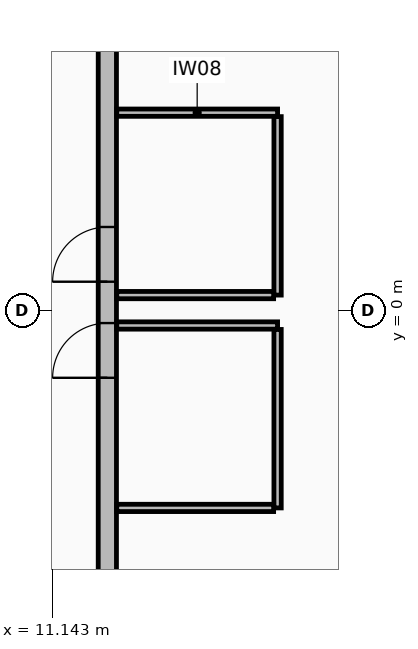
"""IFC4 building model, lengths in metres.
Left out: names, types, materials, properties, quantities, classifications, styles, units other than length and angle.
Written with IfcOpenShell. Run it as: python <this file> out.ifc"""

import sys

from ifc_helpers import new_model, si_unit, direction, frame, frame_2d, origin, place, context, subcontext, project, spatial, rectangle, extrude, element, fill, save


model = new_model("IFC4")
c1 = context("Model", 3, precision=1e-05, world=origin(), true_north=direction((0.0, 1.0)))
c2 = subcontext(c1, "Body", "Model", "MODEL_VIEW")
j1 = project(units=[si_unit("LENGTHUNIT", "METRE"), si_unit("PLANEANGLEUNIT", "RADIAN")], contexts=[c1])
p1 = place(None, origin())
s1 = spatial("IfcSite", under=j1, at=p1, CompositionType="ELEMENT")
p2 = place(p1, origin())
s2 = spatial("IfcBuilding", under=s1, at=p2, CompositionType="ELEMENT")
p3 = place(p2, frame((0.0, 0.0, 165.15)))
s3 = spatial("IfcBuildingStorey", under=s2, at=p3, CompositionType="ELEMENT", Elevation=165.15)
p4 = place(p3, frame((12.05, -10.75, 0.0), z_axis=(0.0, 0.0, 1.0), x_axis=(0.0, 1.0, 0.0)))
e1 = element("IfcWall", 1, at=p4, inside=s3, PredefinedType="STANDARD", context=c2, shape_type="SweptSolid", body=[
    extrude(rectangle(XDim=21.5, YDim=0.3, at=frame_2d((10.75, 0.0))), origin(), (0.0, 0.0, 1.0), 4.465),
])
p5 = place(p4, frame((11.22, 0.0, 0.0)))
e2 = element("IfcOpeningElement", 2, at=p5, cuts=e1, PredefinedType="OPENING", context=c2, shape_type="SweptSolid", body=[
    extrude(rectangle(XDim=0.9, YDim=2.1, at=frame_2d((0.45, 1.05))), frame((0.0, 0.16, 0.0), z_axis=(0.0, -1.0, 0.0), x_axis=(1.0, 0.0, 0.0)), (0.0, 0.0, 1.0), 0.32),
])
p6 = place(p4, frame((9.64, 0.0, 0.0)))
e3 = element("IfcOpeningElement", 3, at=p6, cuts=e1, PredefinedType="OPENING", context=c2, shape_type="SweptSolid", body=[
    extrude(rectangle(XDim=0.9, YDim=2.1, at=frame_2d((0.45, 1.05))), frame((0.0, 0.16, 0.0), z_axis=(0.0, -1.0, 0.0), x_axis=(1.0, 0.0, 0.0)), (0.0, 0.0, 1.0), 0.32),
])
p7 = place(p3, frame((12.205, 3.25, 0.0), z_axis=(0.0, 0.0, 1.0), x_axis=(1.0, 0.0, 0.0)))
e4 = element("IfcWall", 4, at=p7, inside=s3, PredefinedType="PARTITIONING", context=c2, shape_type="SweptSolid", body=[
    extrude(rectangle(XDim=2.645, YDim=0.12, at=frame_2d((1.323, 0.0))), origin(), (0.0, 0.0, 1.0), 5.17),
])
p8 = place(p3, frame((14.85, 3.185, 0.0), z_axis=(0.0, 0.0, 1.0), x_axis=(0.0, -1.0, 0.0)))
e5 = element("IfcWall", 5, at=p8, inside=s3, PredefinedType="PARTITIONING", context=c2, shape_type="SweptSolid", body=[
    extrude(rectangle(XDim=2.935, YDim=0.12, at=frame_2d((1.468, 0.0))), origin(), (0.0, 0.0, 1.0), 5.17),
])
p9 = place(p3, frame((14.785, 0.25, 0.0), z_axis=(0.0, 0.0, 1.0), x_axis=(-1.0, 0.0, 0.0)))
e6 = element("IfcWall", 6, at=p9, inside=s3, PredefinedType="PARTITIONING", context=c2, shape_type="SweptSolid", body=[
    extrude(rectangle(XDim=2.58, YDim=0.12, at=frame_2d((1.29, 0.0))), origin(), (0.0, 0.0, 1.0), 5.17),
])
p10 = place(p3, frame((12.205, -0.25, 0.0), z_axis=(0.0, 0.0, 1.0), x_axis=(1.0, 0.0, 0.0)))
e7 = element("IfcWall", 7, at=p10, inside=s3, PredefinedType="PARTITIONING", context=c2, shape_type="SweptSolid", body=[
    extrude(rectangle(XDim=2.645, YDim=0.12, at=frame_2d((1.323, 0.0))), origin(), (0.0, 0.0, 1.0), 5.17),
])
p11 = place(p3, frame((14.85, -0.315, 0.0), z_axis=(0.0, 0.0, 1.0), x_axis=(0.0, -1.0, 0.0)))
e8 = element("IfcWall", 8, at=p11, inside=s3, PredefinedType="PARTITIONING", context=c2, shape_type="SweptSolid", body=[
    extrude(rectangle(XDim=2.935, YDim=0.12, at=frame_2d((1.468, 0.0))), origin(), (0.0, 0.0, 1.0), 5.17),
])
p12 = place(p3, frame((14.785, -3.25, 0.0), z_axis=(0.0, 0.0, 1.0), x_axis=(-1.0, 0.0, 0.0)))
e9 = element("IfcWall", 9, at=p12, inside=s3, PredefinedType="PARTITIONING", context=c2, shape_type="SweptSolid", body=[
    extrude(rectangle(XDim=2.58, YDim=0.12, at=frame_2d((1.29, 0.0))), origin(), (0.0, 0.0, 1.0), 5.17),
])
p13 = place(p5, origin())
e10 = element("IfcDoor", 10, at=p13, inside=s3, OperationType="SINGLE_SWING_LEFT", PredefinedType="DOOR", context=c2, shape_type="SweptSolid", body=[
    extrude(rectangle(XDim=0.9, YDim=2.1, at=frame_2d((0.45, 1.05))), frame((0.0, 0.025, 0.0), z_axis=(0.0, -1.0, 0.0), x_axis=(1.0, 0.0, 0.0)), (0.0, 0.0, 1.0), 0.05),
])
fill(e2, e10)
p14 = place(p6, origin())
e11 = element("IfcDoor", 11, at=p14, inside=s3, OperationType="SINGLE_SWING_LEFT", PredefinedType="DOOR", context=c2, shape_type="SweptSolid", body=[
    extrude(rectangle(XDim=0.9, YDim=2.1, at=frame_2d((0.45, 1.05))), frame((0.0, 0.025, 0.0), z_axis=(0.0, -1.0, 0.0), x_axis=(1.0, 0.0, 0.0)), (0.0, 0.0, 1.0), 0.05),
])
fill(e3, e11)
save(model, sys.argv[1])
